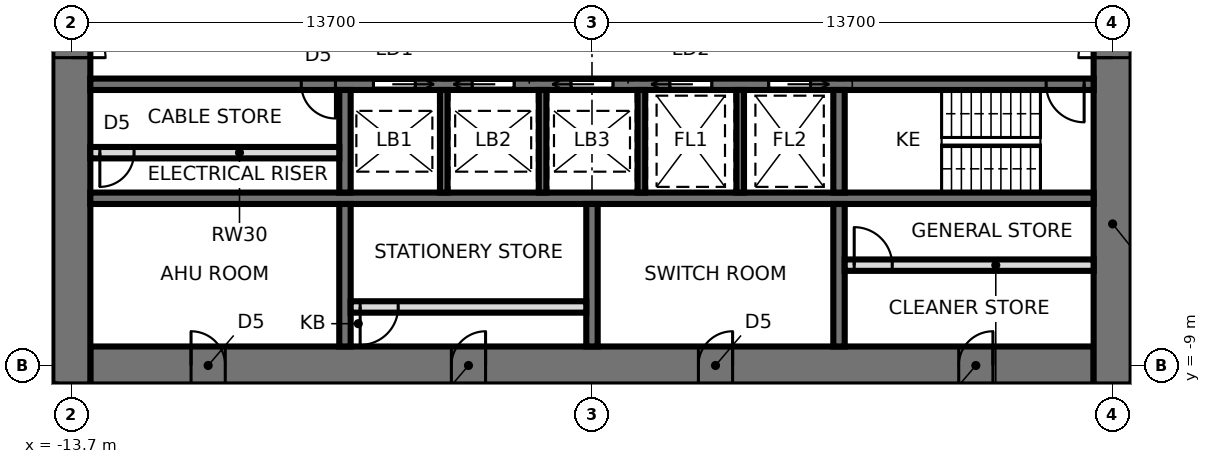
"""IFC4 building model, lengths in metres.
Left out: names, types, materials, properties, quantities, classifications, styles, units other than length and angle.
Written with IfcOpenShell. Run it as: python <this file> out.ifc"""

import sys

from ifc_helpers import new_model, si_unit, direction, frame, frame_2d, origin, place, context, subcontext, project, spatial, rectangle, extrude, element, fill, save


model = new_model("IFC4")
c1 = context("Model", 3, precision=1e-05, world=origin(), true_north=direction((0.0, 1.0)))
c2 = subcontext(c1, "Body", "Model", "MODEL_VIEW")
j1 = project(units=[si_unit("LENGTHUNIT", "METRE"), si_unit("PLANEANGLEUNIT", "RADIAN")], contexts=[c1])
p1 = place(None, origin())
s1 = spatial("IfcSite", under=j1, at=p1, CompositionType="ELEMENT")
p2 = place(p1, origin())
s2 = spatial("IfcBuilding", under=s1, at=p2, CompositionType="ELEMENT")
p3 = place(p2, frame((0.0, 0.0, 127.5)))
s3 = spatial("IfcBuildingStorey", under=s2, at=p3, CompositionType="ELEMENT", Elevation=127.5)
p4 = place(p3, frame((-13.2, -9.0, 0.0), z_axis=(0.0, 0.0, 1.0), x_axis=(1.0, 0.0, 0.0)))
e1 = element("IfcWall", 1, at=p4, inside=s3, PredefinedType="SHEAR", context=c2, shape_type="SweptSolid", body=[
    extrude(rectangle(XDim=26.4, YDim=1.0, at=frame_2d((13.2, 0.0))), origin(), (0.0, 0.0, 1.0), 3.9),
])
p5 = place(p4, frame((2.65, 0.0, 0.0)))
e2 = element("IfcOpeningElement", 2, at=p5, cuts=e1, PredefinedType="OPENING", context=c2, shape_type="SweptSolid", body=[
    extrude(rectangle(XDim=0.9, YDim=2.1, at=frame_2d((0.45, 1.05))), frame((0.0, 0.51, 0.0), z_axis=(0.0, -1.0, 0.0), x_axis=(1.0, 0.0, 0.0)), (0.0, 0.0, 1.0), 1.02),
])
p6 = place(p4, frame((9.5, 0.0, 0.0)))
e3 = element("IfcOpeningElement", 3, at=p6, cuts=e1, PredefinedType="OPENING", context=c2, shape_type="SweptSolid", body=[
    extrude(rectangle(XDim=0.9, YDim=2.1, at=frame_2d((0.45, 1.05))), frame((0.0, 0.51, 0.0), z_axis=(0.0, -1.0, 0.0), x_axis=(1.0, 0.0, 0.0)), (0.0, 0.0, 1.0), 1.02),
])
p7 = place(p4, frame((16.0, 0.0, 0.0)))
e4 = element("IfcOpeningElement", 4, at=p7, cuts=e1, PredefinedType="OPENING", context=c2, shape_type="SweptSolid", body=[
    extrude(rectangle(XDim=0.9, YDim=2.1, at=frame_2d((0.45, 1.05))), frame((0.0, 0.51, 0.0), z_axis=(0.0, -1.0, 0.0), x_axis=(1.0, 0.0, 0.0)), (0.0, 0.0, 1.0), 1.02),
])
p8 = place(p4, frame((22.85, 0.0, 0.0)))
e5 = element("IfcOpeningElement", 5, at=p8, cuts=e1, PredefinedType="OPENING", context=c2, shape_type="SweptSolid", body=[
    extrude(rectangle(XDim=0.9, YDim=2.1, at=frame_2d((0.45, 1.05))), frame((0.0, 0.51, 0.0), z_axis=(0.0, -1.0, 0.0), x_axis=(1.0, 0.0, 0.0)), (0.0, 0.0, 1.0), 1.02),
])
p9 = place(p3, frame((13.7, -9.5, 0.0), z_axis=(0.0, 0.0, 1.0), x_axis=(0.0, 1.0, 0.0)))
e6 = element("IfcWall", 6, at=p9, inside=s3, PredefinedType="SHEAR", context=c2, shape_type="SweptSolid", body=[
    extrude(rectangle(XDim=19.0, YDim=1.0, at=frame_2d((9.5, 0.0))), origin(), (0.0, 0.0, 1.0), 3.9),
])
p10 = place(p9, frame((8.6, 0.0, 0.0)))
e7 = element("IfcOpeningElement", 7, at=p10, cuts=e6, PredefinedType="OPENING", context=c2, shape_type="SweptSolid", body=[
    extrude(rectangle(XDim=1.8, YDim=2.4, at=frame_2d((0.9, 1.2))), frame((0.0, 0.51, 0.0), z_axis=(0.0, -1.0, 0.0), x_axis=(1.0, 0.0, 0.0)), (0.0, 0.0, 1.0), 1.02),
])
p11 = place(p3, frame((-13.7, 9.5, 0.0), z_axis=(0.0, 0.0, 1.0), x_axis=(0.0, -1.0, 0.0)))
e8 = element("IfcWall", 8, at=p11, inside=s3, PredefinedType="SHEAR", context=c2, shape_type="SweptSolid", body=[
    extrude(rectangle(XDim=19.0, YDim=1.0, at=frame_2d((9.5, 0.0))), origin(), (0.0, 0.0, 1.0), 3.9),
])
p12 = place(p11, frame((8.6, 0.0, 0.0)))
e9 = element("IfcOpeningElement", 9, at=p12, cuts=e8, PredefinedType="OPENING", context=c2, shape_type="SweptSolid", body=[
    extrude(rectangle(XDim=1.8, YDim=2.4, at=frame_2d((0.9, 1.2))), frame((0.0, 0.51, 0.0), z_axis=(0.0, -1.0, 0.0), x_axis=(1.0, 0.0, 0.0)), (0.0, 0.0, 1.0), 1.02),
])
p13 = place(p3, frame((-13.2, -1.6, 0.0), z_axis=(0.0, 0.0, 1.0), x_axis=(1.0, 0.0, 0.0)))
e10 = element("IfcWall", 10, at=p13, inside=s3, PredefinedType="SHEAR", context=c2, shape_type="SweptSolid", body=[
    extrude(rectangle(XDim=26.4, YDim=0.3, at=frame_2d((13.2, 0.0))), origin(), (0.0, 0.0, 1.0), 3.9),
])
p14 = place(p13, frame((25.15, 0.0, 0.0)))
e11 = element("IfcOpeningElement", 11, at=p14, cuts=e10, PredefinedType="OPENING", context=c2, shape_type="SweptSolid", body=[
    extrude(rectangle(XDim=1.0, YDim=2.1, at=frame_2d((0.5, 1.05))), frame((0.0, 0.16, 0.0), z_axis=(0.0, -1.0, 0.0), x_axis=(1.0, 0.0, 0.0)), (0.0, 0.0, 1.0), 0.32),
])
p15 = place(p13, frame((7.45, 0.0, 0.0)))
e12 = element("IfcOpeningElement", 12, at=p15, cuts=e10, PredefinedType="OPENING", context=c2, shape_type="SweptSolid", body=[
    extrude(rectangle(XDim=1.1, YDim=2.3, at=frame_2d((0.55, 1.15))), frame((0.0, 0.16, 0.0), z_axis=(0.0, -1.0, 0.0), x_axis=(1.0, 0.0, 0.0)), (0.0, 0.0, 1.0), 0.32),
])
p16 = place(p13, frame((10.05, 0.0, 0.0)))
e13 = element("IfcOpeningElement", 13, at=p16, cuts=e10, PredefinedType="OPENING", context=c2, shape_type="SweptSolid", body=[
    extrude(rectangle(XDim=1.1, YDim=2.3, at=frame_2d((0.55, 1.15))), frame((0.0, 0.16, 0.0), z_axis=(0.0, -1.0, 0.0), x_axis=(1.0, 0.0, 0.0)), (0.0, 0.0, 1.0), 0.32),
])
p17 = place(p13, frame((12.65, 0.0, 0.0)))
e14 = element("IfcOpeningElement", 14, at=p17, cuts=e10, PredefinedType="OPENING", context=c2, shape_type="SweptSolid", body=[
    extrude(rectangle(XDim=1.1, YDim=2.3, at=frame_2d((0.55, 1.15))), frame((0.0, 0.16, 0.0), z_axis=(0.0, -1.0, 0.0), x_axis=(1.0, 0.0, 0.0)), (0.0, 0.0, 1.0), 0.32),
])
p18 = place(p13, frame((15.25, 0.0, 0.0)))
e15 = element("IfcOpeningElement", 15, at=p18, cuts=e10, PredefinedType="OPENING", context=c2, shape_type="SweptSolid", body=[
    extrude(rectangle(XDim=1.1, YDim=2.3, at=frame_2d((0.55, 1.15))), frame((0.0, 0.16, 0.0), z_axis=(0.0, -1.0, 0.0), x_axis=(1.0, 0.0, 0.0)), (0.0, 0.0, 1.0), 0.32),
])
p19 = place(p13, frame((17.85, 0.0, 0.0)))
e16 = element("IfcOpeningElement", 16, at=p19, cuts=e10, PredefinedType="OPENING", context=c2, shape_type="SweptSolid", body=[
    extrude(rectangle(XDim=1.1, YDim=2.3, at=frame_2d((0.55, 1.15))), frame((0.0, 0.16, 0.0), z_axis=(0.0, -1.0, 0.0), x_axis=(1.0, 0.0, 0.0)), (0.0, 0.0, 1.0), 0.32),
])
p20 = place(p13, frame((5.55, 0.0, 0.0)))
e17 = element("IfcOpeningElement", 17, at=p20, cuts=e10, PredefinedType="OPENING", context=c2, shape_type="SweptSolid", body=[
    extrude(rectangle(XDim=0.9, YDim=2.1, at=frame_2d((0.45, 1.05))), frame((0.0, 0.16, 0.0), z_axis=(0.0, -1.0, 0.0), x_axis=(1.0, 0.0, 0.0)), (0.0, 0.0, 1.0), 0.32),
])
p21 = place(p3, frame((-13.2, -4.6, 0.0), z_axis=(0.0, 0.0, 1.0), x_axis=(1.0, 0.0, 0.0)))
e18 = element("IfcWall", 18, at=p21, inside=s3, PredefinedType="SHEAR", context=c2, shape_type="SweptSolid", body=[
    extrude(rectangle(XDim=26.4, YDim=0.3, at=frame_2d((13.2, 0.0))), origin(), (0.0, 0.0, 1.0), 3.9),
])
p22 = place(p3, frame((-6.5, -1.75, 0.0), z_axis=(0.0, 0.0, 1.0), x_axis=(0.0, -1.0, 0.0)))
e19 = element("IfcWall", 19, at=p22, inside=s3, PredefinedType="SHEAR", context=c2, shape_type="SweptSolid", body=[
    extrude(rectangle(XDim=2.7, YDim=0.3, at=frame_2d((1.35, 0.0))), origin(), (0.0, 0.0, 1.0), 3.9),
])
p23 = place(p3, frame((-6.5, -4.75, 0.0), z_axis=(0.0, 0.0, 1.0), x_axis=(0.0, -1.0, 0.0)))
e20 = element("IfcWall", 20, at=p23, inside=s3, PredefinedType="SHEAR", context=c2, shape_type="SweptSolid", body=[
    extrude(rectangle(XDim=3.75, YDim=0.3, at=frame_2d((1.875, 0.0))), origin(), (0.0, 0.0, 1.0), 3.9),
])
p24 = place(p3, frame((6.5, -1.75, 0.0), z_axis=(0.0, 0.0, 1.0), x_axis=(0.0, -1.0, 0.0)))
e21 = element("IfcWall", 21, at=p24, inside=s3, PredefinedType="SHEAR", context=c2, shape_type="SweptSolid", body=[
    extrude(rectangle(XDim=2.7, YDim=0.3, at=frame_2d((1.35, 0.0))), origin(), (0.0, 0.0, 1.0), 3.9),
])
p25 = place(p3, frame((6.5, -4.75, 0.0), z_axis=(0.0, 0.0, 1.0), x_axis=(0.0, -1.0, 0.0)))
e22 = element("IfcWall", 22, at=p25, inside=s3, PredefinedType="SHEAR", context=c2, shape_type="SweptSolid", body=[
    extrude(rectangle(XDim=3.75, YDim=0.3, at=frame_2d((1.875, 0.0))), origin(), (0.0, 0.0, 1.0), 3.9),
])
for number, where, z_axis, x_axis in (
    (23, (-3.9, -1.75, 0.0), (0.0, 0.0, 1.0), (0.0, -1.0, 0.0)),
    (24, (-1.3, -1.75, 0.0), (0.0, 0.0, 1.0), (0.0, -1.0, 0.0)),
    (25, (1.3, -1.75, 0.0), (0.0, 0.0, 1.0), (0.0, -1.0, 0.0)),
    (26, (3.9, -1.75, 0.0), (0.0, 0.0, 1.0), (0.0, -1.0, 0.0)),
):
    element("IfcWall", number, at=place(p3, frame(where, z_axis=z_axis, x_axis=x_axis)), inside=s3, PredefinedType="SHEAR", context=c2, shape_type="SweptSolid", body=[
        extrude(rectangle(XDim=2.7, YDim=0.2, at=frame_2d((1.35, 0.0))), origin(), (0.0, 0.0, 1.0), 3.9),
    ])
p26 = place(p3, frame((0.0, -4.75, 0.0), z_axis=(0.0, 0.0, 1.0), x_axis=(0.0, -1.0, 0.0)))
e27 = element("IfcWall", 27, at=p26, inside=s3, PredefinedType="SHEAR", context=c2, shape_type="SweptSolid", body=[
    extrude(rectangle(XDim=3.75, YDim=0.3, at=frame_2d((1.875, 0.0))), origin(), (0.0, 0.0, 1.0), 3.9),
])
p27 = place(p3, frame((-6.35, -7.46, 0.0), z_axis=(0.0, 0.0, 1.0), x_axis=(1.0, 0.0, 0.0)))
e28 = element("IfcWall", 28, at=p27, inside=s3, PredefinedType="PARTITIONING", context=c2, shape_type="SweptSolid", body=[
    extrude(rectangle(XDim=6.2, YDim=0.3, at=frame_2d((3.1, 0.0))), origin(), (0.0, 0.0, 1.0), 3.74),
])
p28 = place(p27, frame((0.25, 0.0, 0.0)))
e29 = element("IfcOpeningElement", 29, at=p28, cuts=e28, PredefinedType="OPENING", context=c2, shape_type="SweptSolid", body=[
    extrude(rectangle(XDim=1.0, YDim=2.4, at=frame_2d((0.5, 1.2))), frame((0.0, 0.16, 0.0), z_axis=(0.0, -1.0, 0.0), x_axis=(1.0, 0.0, 0.0)), (0.0, 0.0, 1.0), 0.32),
])
p29 = place(p3, frame((6.65, -6.36, 0.0), z_axis=(0.0, 0.0, 1.0), x_axis=(1.0, 0.0, 0.0)))
e30 = element("IfcWall", 30, at=p29, inside=s3, PredefinedType="PARTITIONING", context=c2, shape_type="SweptSolid", body=[
    extrude(rectangle(XDim=6.55, YDim=0.3, at=frame_2d((3.275, 0.0))), origin(), (0.0, 0.0, 1.0), 3.74),
])
p30 = place(p29, frame((0.25, 0.0, 0.0)))
e31 = element("IfcOpeningElement", 31, at=p30, cuts=e30, PredefinedType="OPENING", context=c2, shape_type="SweptSolid", body=[
    extrude(rectangle(XDim=1.0, YDim=2.4, at=frame_2d((0.5, 1.2))), frame((0.0, 0.16, 0.0), z_axis=(0.0, -1.0, 0.0), x_axis=(1.0, 0.0, 0.0)), (0.0, 0.0, 1.0), 0.32),
])
p31 = place(p3, frame((-13.2, -3.4, 0.0), z_axis=(0.0, 0.0, 1.0), x_axis=(1.0, 0.0, 0.0)))
e32 = element("IfcWall", 32, at=p31, inside=s3, PredefinedType="SOLIDWALL", context=c2, shape_type="SweptSolid", body=[
    extrude(rectangle(XDim=6.55, YDim=0.3, at=frame_2d((3.275, 0.0))), origin(), (0.0, 0.0, 1.0), 3.74),
])
p32 = place(p31, frame((0.25, 0.0, 0.0)))
e33 = element("IfcOpeningElement", 33, at=p32, cuts=e32, PredefinedType="OPENING", context=c2, shape_type="SweptSolid", body=[
    extrude(rectangle(XDim=0.9, YDim=2.1, at=frame_2d((0.45, 1.05))), frame((0.0, 0.16, 0.0), z_axis=(0.0, -1.0, 0.0), x_axis=(1.0, 0.0, 0.0)), (0.0, 0.0, 1.0), 0.32),
])
p33 = place(p3, frame((-14.2, -9.5, 0.0), z_axis=(0.0, 0.0, 1.0), x_axis=(0.0, -1.0, 0.0)))
e34 = element("IfcWall", 34, at=p33, inside=s3, PredefinedType="PARTITIONING", context=c2, shape_type="SweptSolid", body=[
    extrude(rectangle(XDim=1.8, YDim=0.15, at=frame_2d((0.9, 0.0))), origin(), (0.0, 0.0, 1.0), 3.74),
])
p34 = place(p12, origin())
e35 = element("IfcDoor", 35, at=p34, inside=s3, OperationType="DOUBLE_DOOR_SINGLE_SWING", PredefinedType="DOOR", context=c2, shape_type="SweptSolid", body=[
    extrude(rectangle(XDim=1.72, YDim=2.36, at=frame_2d((0.9, 1.18))), frame((0.0, 0.025, 0.0), z_axis=(0.0, -1.0, 0.0), x_axis=(1.0, 0.0, 0.0)), (0.0, 0.0, 1.0), 0.05),
    extrude(rectangle(XDim=0.04, YDim=2.4, at=frame_2d((0.02, 1.2))), frame((0.0, 0.25, 0.0), z_axis=(0.0, -1.0, 0.0), x_axis=(1.0, 0.0, 0.0)), (0.0, 0.0, 1.0), 0.5),
    extrude(rectangle(XDim=0.04, YDim=2.4, at=frame_2d((1.78, 1.2))), frame((0.0, 0.25, 0.0), z_axis=(0.0, -1.0, 0.0), x_axis=(1.0, 0.0, 0.0)), (0.0, 0.0, 1.0), 0.5),
    extrude(rectangle(XDim=1.72, YDim=0.04, at=frame_2d((0.9, 2.38))), frame((0.0, 0.25, 0.0), z_axis=(0.0, -1.0, 0.0), x_axis=(1.0, 0.0, 0.0)), (0.0, 0.0, 1.0), 0.5),
])
fill(e9, e35)
p35 = place(p10, origin())
e36 = element("IfcDoor", 36, at=p35, inside=s3, OperationType="DOUBLE_DOOR_SINGLE_SWING", PredefinedType="DOOR", context=c2, shape_type="SweptSolid", body=[
    extrude(rectangle(XDim=1.72, YDim=2.36, at=frame_2d((0.9, 1.18))), frame((0.0, 0.025, 0.0), z_axis=(0.0, -1.0, 0.0), x_axis=(1.0, 0.0, 0.0)), (0.0, 0.0, 1.0), 0.05),
    extrude(rectangle(XDim=0.04, YDim=2.4, at=frame_2d((0.02, 1.2))), frame((0.0, 0.25, 0.0), z_axis=(0.0, -1.0, 0.0), x_axis=(1.0, 0.0, 0.0)), (0.0, 0.0, 1.0), 0.5),
    extrude(rectangle(XDim=0.04, YDim=2.4, at=frame_2d((1.78, 1.2))), frame((0.0, 0.25, 0.0), z_axis=(0.0, -1.0, 0.0), x_axis=(1.0, 0.0, 0.0)), (0.0, 0.0, 1.0), 0.5),
    extrude(rectangle(XDim=1.72, YDim=0.04, at=frame_2d((0.9, 2.38))), frame((0.0, 0.25, 0.0), z_axis=(0.0, -1.0, 0.0), x_axis=(1.0, 0.0, 0.0)), (0.0, 0.0, 1.0), 0.5),
])
fill(e7, e36)
p36 = place(p14, frame((1.0, 0.0, 0.0), z_axis=(0.0, 0.0, 1.0), x_axis=(-1.0, 0.0, 0.0)))
e37 = element("IfcDoor", 37, at=p36, inside=s3, OperationType="SINGLE_SWING_LEFT", PredefinedType="DOOR", context=c2, shape_type="SweptSolid", body=[
    extrude(rectangle(XDim=1.0, YDim=2.1, at=frame_2d((0.5, 1.05))), frame((0.0, 0.025, 0.0), z_axis=(0.0, -1.0, 0.0), x_axis=(1.0, 0.0, 0.0)), (0.0, 0.0, 1.0), 0.05),
])
fill(e11, e37)
p37 = place(p15, frame((1.1, 0.0, 0.0), z_axis=(0.0, 0.0, 1.0), x_axis=(-1.0, 0.0, 0.0)))
e38 = element("IfcDoor", 38, at=p37, inside=s3, OperationType="SLIDING_TO_LEFT", PredefinedType="DOOR", context=c2, shape_type="SweptSolid", body=[
    extrude(rectangle(XDim=1.1, YDim=2.3, at=frame_2d((0.55, 1.15))), frame((0.0, 0.025, 0.0), z_axis=(0.0, -1.0, 0.0), x_axis=(1.0, 0.0, 0.0)), (0.0, 0.0, 1.0), 0.05),
])
fill(e12, e38)
p38 = place(p16, frame((1.1, 0.0, 0.0), z_axis=(0.0, 0.0, 1.0), x_axis=(-1.0, 0.0, 0.0)))
e39 = element("IfcDoor", 39, at=p38, inside=s3, OperationType="SLIDING_TO_RIGHT", PredefinedType="DOOR", context=c2, shape_type="SweptSolid", body=[
    extrude(rectangle(XDim=1.1, YDim=2.3, at=frame_2d((0.55, 1.15))), frame((0.0, 0.025, 0.0), z_axis=(0.0, -1.0, 0.0), x_axis=(1.0, 0.0, 0.0)), (0.0, 0.0, 1.0), 0.05),
])
fill(e13, e39)
p39 = place(p17, frame((1.1, 0.0, 0.0), z_axis=(0.0, 0.0, 1.0), x_axis=(-1.0, 0.0, 0.0)))
e40 = element("IfcDoor", 40, at=p39, inside=s3, OperationType="SLIDING_TO_RIGHT", PredefinedType="DOOR", context=c2, shape_type="SweptSolid", body=[
    extrude(rectangle(XDim=1.1, YDim=2.3, at=frame_2d((0.55, 1.15))), frame((0.0, 0.025, 0.0), z_axis=(0.0, -1.0, 0.0), x_axis=(1.0, 0.0, 0.0)), (0.0, 0.0, 1.0), 0.05),
])
fill(e14, e40)
p40 = place(p18, frame((1.1, 0.0, 0.0), z_axis=(0.0, 0.0, 1.0), x_axis=(-1.0, 0.0, 0.0)))
e41 = element("IfcDoor", 41, at=p40, inside=s3, OperationType="SLIDING_TO_RIGHT", PredefinedType="DOOR", context=c2, shape_type="SweptSolid", body=[
    extrude(rectangle(XDim=1.1, YDim=2.3, at=frame_2d((0.55, 1.15))), frame((0.0, 0.025, 0.0), z_axis=(0.0, -1.0, 0.0), x_axis=(1.0, 0.0, 0.0)), (0.0, 0.0, 1.0), 0.05),
])
fill(e15, e41)
p41 = place(p19, frame((1.1, 0.0, 0.0), z_axis=(0.0, 0.0, 1.0), x_axis=(-1.0, 0.0, 0.0)))
e42 = element("IfcDoor", 42, at=p41, inside=s3, OperationType="SLIDING_TO_LEFT", PredefinedType="DOOR", context=c2, shape_type="SweptSolid", body=[
    extrude(rectangle(XDim=1.1, YDim=2.3, at=frame_2d((0.55, 1.15))), frame((0.0, 0.025, 0.0), z_axis=(0.0, -1.0, 0.0), x_axis=(1.0, 0.0, 0.0)), (0.0, 0.0, 1.0), 0.05),
])
fill(e16, e42)
p42 = place(p20, frame((0.9, 0.0, 0.0), z_axis=(0.0, 0.0, 1.0), x_axis=(-1.0, 0.0, 0.0)))
e43 = element("IfcDoor", 43, at=p42, inside=s3, OperationType="SINGLE_SWING_LEFT", PredefinedType="DOOR", context=c2, shape_type="SweptSolid", body=[
    extrude(rectangle(XDim=0.9, YDim=2.1, at=frame_2d((0.45, 1.05))), frame((0.0, 0.025, 0.0), z_axis=(0.0, -1.0, 0.0), x_axis=(1.0, 0.0, 0.0)), (0.0, 0.0, 1.0), 0.05),
])
fill(e17, e43)
p43 = place(p5, origin())
e44 = element("IfcDoor", 44, at=p43, inside=s3, OperationType="SINGLE_SWING_LEFT", PredefinedType="DOOR", context=c2, shape_type="SweptSolid", body=[
    extrude(rectangle(XDim=0.82, YDim=2.06, at=frame_2d((0.45, 1.03))), frame((0.0, 0.025, 0.0), z_axis=(0.0, -1.0, 0.0), x_axis=(1.0, 0.0, 0.0)), (0.0, 0.0, 1.0), 0.05),
    extrude(rectangle(XDim=0.04, YDim=2.1, at=frame_2d((0.02, 1.05))), frame((0.0, 0.25, 0.0), z_axis=(0.0, -1.0, 0.0), x_axis=(1.0, 0.0, 0.0)), (0.0, 0.0, 1.0), 0.5),
    extrude(rectangle(XDim=0.04, YDim=2.1, at=frame_2d((0.88, 1.05))), frame((0.0, 0.25, 0.0), z_axis=(0.0, -1.0, 0.0), x_axis=(1.0, 0.0, 0.0)), (0.0, 0.0, 1.0), 0.5),
    extrude(rectangle(XDim=0.82, YDim=0.04, at=frame_2d((0.45, 2.08))), frame((0.0, 0.25, 0.0), z_axis=(0.0, -1.0, 0.0), x_axis=(1.0, 0.0, 0.0)), (0.0, 0.0, 1.0), 0.5),
])
fill(e2, e44)
p44 = place(p6, origin())
e45 = element("IfcDoor", 45, at=p44, inside=s3, OperationType="SINGLE_SWING_RIGHT", PredefinedType="DOOR", context=c2, shape_type="SweptSolid", body=[
    extrude(rectangle(XDim=0.82, YDim=2.06, at=frame_2d((0.45, 1.03))), frame((0.0, 0.025, 0.0), z_axis=(0.0, -1.0, 0.0), x_axis=(1.0, 0.0, 0.0)), (0.0, 0.0, 1.0), 0.05),
    extrude(rectangle(XDim=0.04, YDim=2.1, at=frame_2d((0.02, 1.05))), frame((0.0, 0.25, 0.0), z_axis=(0.0, -1.0, 0.0), x_axis=(1.0, 0.0, 0.0)), (0.0, 0.0, 1.0), 0.5),
    extrude(rectangle(XDim=0.04, YDim=2.1, at=frame_2d((0.88, 1.05))), frame((0.0, 0.25, 0.0), z_axis=(0.0, -1.0, 0.0), x_axis=(1.0, 0.0, 0.0)), (0.0, 0.0, 1.0), 0.5),
    extrude(rectangle(XDim=0.82, YDim=0.04, at=frame_2d((0.45, 2.08))), frame((0.0, 0.25, 0.0), z_axis=(0.0, -1.0, 0.0), x_axis=(1.0, 0.0, 0.0)), (0.0, 0.0, 1.0), 0.5),
])
fill(e3, e45)
p45 = place(p7, origin())
e46 = element("IfcDoor", 46, at=p45, inside=s3, OperationType="SINGLE_SWING_RIGHT", PredefinedType="DOOR", context=c2, shape_type="SweptSolid", body=[
    extrude(rectangle(XDim=0.82, YDim=2.06, at=frame_2d((0.45, 1.03))), frame((0.0, 0.025, 0.0), z_axis=(0.0, -1.0, 0.0), x_axis=(1.0, 0.0, 0.0)), (0.0, 0.0, 1.0), 0.05),
    extrude(rectangle(XDim=0.04, YDim=2.1, at=frame_2d((0.02, 1.05))), frame((0.0, 0.25, 0.0), z_axis=(0.0, -1.0, 0.0), x_axis=(1.0, 0.0, 0.0)), (0.0, 0.0, 1.0), 0.5),
    extrude(rectangle(XDim=0.04, YDim=2.1, at=frame_2d((0.88, 1.05))), frame((0.0, 0.25, 0.0), z_axis=(0.0, -1.0, 0.0), x_axis=(1.0, 0.0, 0.0)), (0.0, 0.0, 1.0), 0.5),
    extrude(rectangle(XDim=0.82, YDim=0.04, at=frame_2d((0.45, 2.08))), frame((0.0, 0.25, 0.0), z_axis=(0.0, -1.0, 0.0), x_axis=(1.0, 0.0, 0.0)), (0.0, 0.0, 1.0), 0.5),
])
fill(e4, e46)
p46 = place(p8, origin())
e47 = element("IfcDoor", 47, at=p46, inside=s3, OperationType="SINGLE_SWING_RIGHT", PredefinedType="DOOR", context=c2, shape_type="SweptSolid", body=[
    extrude(rectangle(XDim=0.82, YDim=2.06, at=frame_2d((0.45, 1.03))), frame((0.0, 0.025, 0.0), z_axis=(0.0, -1.0, 0.0), x_axis=(1.0, 0.0, 0.0)), (0.0, 0.0, 1.0), 0.05),
    extrude(rectangle(XDim=0.04, YDim=2.1, at=frame_2d((0.02, 1.05))), frame((0.0, 0.25, 0.0), z_axis=(0.0, -1.0, 0.0), x_axis=(1.0, 0.0, 0.0)), (0.0, 0.0, 1.0), 0.5),
    extrude(rectangle(XDim=0.04, YDim=2.1, at=frame_2d((0.88, 1.05))), frame((0.0, 0.25, 0.0), z_axis=(0.0, -1.0, 0.0), x_axis=(1.0, 0.0, 0.0)), (0.0, 0.0, 1.0), 0.5),
    extrude(rectangle(XDim=0.82, YDim=0.04, at=frame_2d((0.45, 2.08))), frame((0.0, 0.25, 0.0), z_axis=(0.0, -1.0, 0.0), x_axis=(1.0, 0.0, 0.0)), (0.0, 0.0, 1.0), 0.5),
])
fill(e5, e47)
p47 = place(p28, frame((1.0, 0.0, 0.0), z_axis=(0.0, 0.0, 1.0), x_axis=(-1.0, 0.0, 0.0)))
e48 = element("IfcDoor", 48, at=p47, inside=s3, OperationType="SINGLE_SWING_RIGHT", PredefinedType="DOOR", context=c2, shape_type="SweptSolid", body=[
    extrude(rectangle(XDim=1.0, YDim=2.4, at=frame_2d((0.5, 1.2))), frame((0.0, 0.025, 0.0), z_axis=(0.0, -1.0, 0.0), x_axis=(1.0, 0.0, 0.0)), (0.0, 0.0, 1.0), 0.05),
])
fill(e29, e48)
p48 = place(p30, origin())
e49 = element("IfcDoor", 49, at=p48, inside=s3, OperationType="SINGLE_SWING_LEFT", PredefinedType="DOOR", context=c2, shape_type="SweptSolid", body=[
    extrude(rectangle(XDim=1.0, YDim=2.4, at=frame_2d((0.5, 1.2))), frame((0.0, 0.025, 0.0), z_axis=(0.0, -1.0, 0.0), x_axis=(1.0, 0.0, 0.0)), (0.0, 0.0, 1.0), 0.05),
])
fill(e31, e49)
p49 = place(p32, frame((0.9, 0.0, 0.0), z_axis=(0.0, 0.0, 1.0), x_axis=(-1.0, 0.0, 0.0)))
e50 = element("IfcDoor", 50, at=p49, inside=s3, OperationType="SINGLE_SWING_RIGHT", PredefinedType="DOOR", context=c2, shape_type="SweptSolid", body=[
    extrude(rectangle(XDim=0.9, YDim=2.1, at=frame_2d((0.45, 1.05))), frame((0.0, 0.025, 0.0), z_axis=(0.0, -1.0, 0.0), x_axis=(1.0, 0.0, 0.0)), (0.0, 0.0, 1.0), 0.05),
])
fill(e33, e50)
save(model, sys.argv[1])
